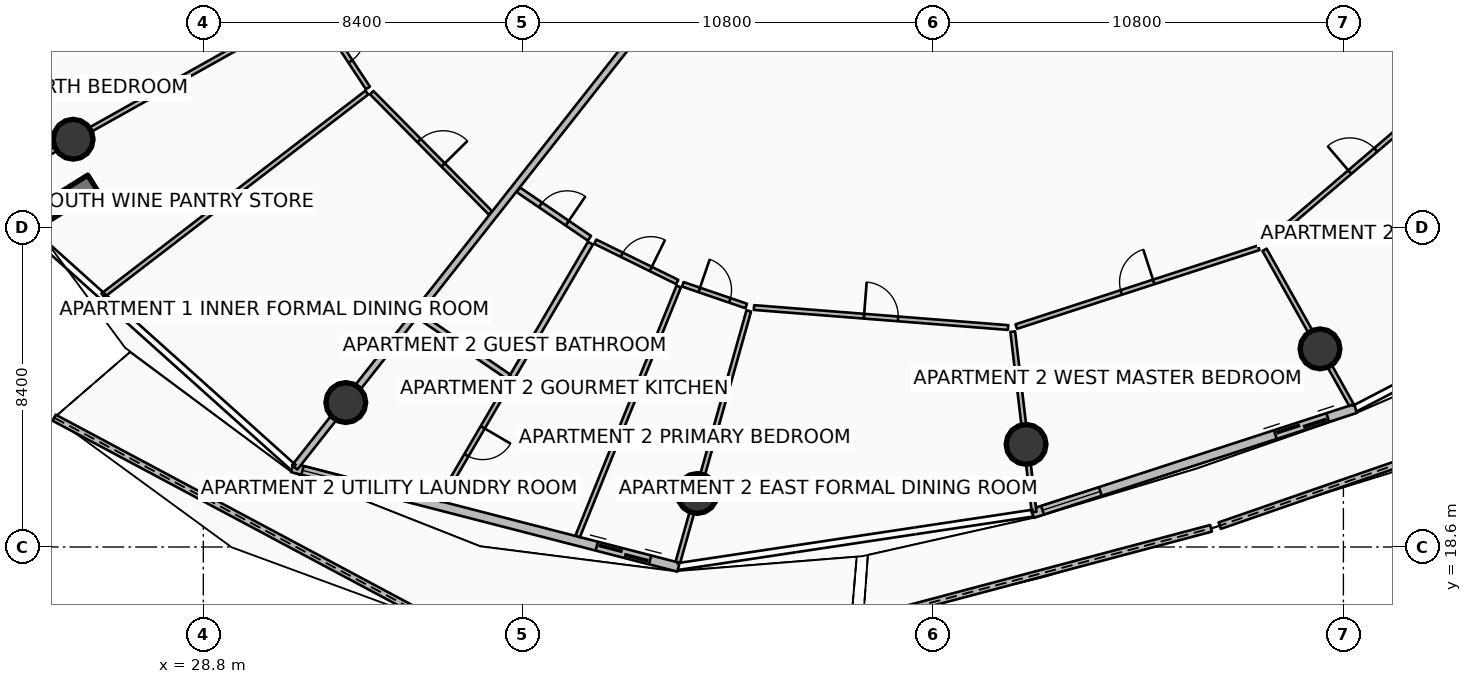
"""IFC4 building model, lengths in metres.
Left out: names, types, materials, properties, quantities, classifications, styles, units other than length and angle.
Written with IfcOpenShell. Run it as: python <this file> out.ifc"""

import sys

from ifc_helpers import new_model, si_unit, direction, frame, frame_2d, origin, origin_2d, place, context, subcontext, project, spatial, polyline, rectangle, circle, outline, extrude, element, fill, save


model = new_model("IFC4")
c1 = context("Model", 3, precision=1e-05, world=origin(), true_north=direction((0.0, 1.0)))
c2 = subcontext(c1, "Body", "Model", "MODEL_VIEW")
j1 = project(units=[si_unit("LENGTHUNIT", "METRE"), si_unit("PLANEANGLEUNIT", "RADIAN")], contexts=[c1])
p1 = place(None, origin())
s1 = spatial("IfcSite", under=j1, at=p1, CompositionType="ELEMENT")
p2 = place(p1, origin())
s2 = spatial("IfcBuilding", under=s1, at=p2, CompositionType="ELEMENT")
p3 = place(p2, frame((0.0, 0.0, 214.05)))
s3 = spatial("IfcBuildingStorey", under=s2, at=p3, CompositionType="ELEMENT", Elevation=214.05)
p4 = place(p3, frame((25.886, 28.182, 0.0), z_axis=(0.0, 0.0, 1.0), x_axis=(-0.848033572426, -0.529942506352, 0.0)))
e1 = element("IfcWall", 1, at=p4, inside=s3, PredefinedType="SOLIDWALL", context=c2, shape_type="SweptSolid", body=[
    extrude(rectangle(XDim=3.5, YDim=0.48, at=frame_2d((1.75, 0.0))), origin(), (0.0, 0.0, 1.0), 3.75),
])
for number, where, z_axis, x_axis in (
    (2, (25.375, 29.329, 0.0), (0.0, 0.0, 1.0), (1.0, 0.0, 0.0)),
    (3, (32.549, 22.401, 0.0), (0.0, 0.0, 1.0), (1.0, 0.0, 0.0)),
    (4, (41.798, 20.008, 0.0), (0.0, 0.0, 1.0), (1.0, 0.0, 0.0)),
    (5, (50.45, 21.3, 0.0), (0.0, 0.0, 1.0), (1.0, 0.0, 0.0)),
    (6, (58.185, 23.814, 0.0), (0.0, 0.0, 1.0), (1.0, 0.0, 0.0)),
):
    element("IfcColumn", number, at=place(p3, frame(where, z_axis=z_axis, x_axis=x_axis)), inside=s3, PredefinedType="COLUMN", context=c2, shape_type="SweptSolid", body=[
        extrude(circle(Radius=0.525, at=origin_2d()), origin(), (0.0, 0.0, 1.0), 3.5),
    ])
p5 = place(p3, frame((24.874, 22.003, 0.0), z_axis=(0.0, 0.0, 1.0), x_axis=(0.882077945567, -0.471103489632, 0.0)))
e7 = element("IfcWall", 7, at=p5, inside=s3, PredefinedType="PARAPET", context=c2, shape_type="SweptSolid", body=[
    extrude(outline(polyline([(0.0, 0.0), (11.409, 0.0), (11.409, 1.632), (5.705, 1.798), (0.0, 1.86), (0.0, 0.0)])), frame((0.0, 0.09, 0.0), z_axis=(0.0, -1.0, 0.0), x_axis=(1.0, 0.0, 0.0)), (0.0, 0.0, 1.0), 0.18),
])
p6 = place(p3, frame((46.162, 16.662, 0.0), z_axis=(0.0, 0.0, 1.0), x_axis=(0.96653117448, 0.256549193642, 0.0)))
e8 = element("IfcWall", 8, at=p6, inside=s3, PredefinedType="PARAPET", context=c2, shape_type="SweptSolid", body=[
    extrude(outline(polyline([(0.0, 0.0), (9.473, 0.0), (9.473, 1.148), (4.736, 1.127), (0.0, 1.224), (0.0, 0.0)])), frame((0.0, 0.09, 0.0), z_axis=(0.0, -1.0, 0.0), x_axis=(1.0, 0.0, 0.0)), (0.0, 0.0, 1.0), 0.18),
])
p7 = place(p3, frame((55.547, 19.162, 0.0), z_axis=(0.0, 0.0, 1.0), x_axis=(0.944943422405, 0.327233752007, 0.0)))
e9 = element("IfcWall", 9, at=p7, inside=s3, PredefinedType="PARAPET", context=c2, shape_type="SweptSolid", body=[
    extrude(outline(polyline([(0.0, 0.0), (9.597, 0.0), (9.598, 1.483), (4.799, 1.284), (0.0, 1.148), (0.0, 0.0)])), frame((0.0, 0.09, 0.0), z_axis=(0.0, -1.0, 0.0), x_axis=(1.0, 0.0, 0.0)), (0.0, 0.0, 1.0), 0.18),
])
p8 = place(p3, frame((31.14, 20.687, 0.0), z_axis=(0.0, 0.0, 1.0), x_axis=(0.968374028006, -0.249502989727, 0.0)))
e10 = element("IfcWall", 10, at=p8, inside=s3, PredefinedType="SOLIDWALL", context=c2, shape_type="SweptSolid", body=[
    extrude(rectangle(XDim=10.494, YDim=0.24, at=frame_2d((5.247, 0.0))), origin(), (0.0, 0.0, 1.0), 2.45),
])
p9 = place(p8, frame((8.274, 0.0, 0.0)))
e11 = element("IfcOpeningElement", 11, at=p9, cuts=e10, PredefinedType="OPENING", context=c2, shape_type="SweptSolid", body=[
    extrude(rectangle(XDim=1.45, YDim=2.15, at=frame_2d((0.725, 1.075))), frame((0.0, 0.13, 0.0), z_axis=(0.0, -1.0, 0.0), x_axis=(1.0, 0.0, 0.0)), (0.0, 0.0, 1.0), 0.26),
])
p10 = place(p8, frame((0.28, 0.0, 0.65)))
e12 = element("IfcOpeningElement", 12, at=p10, cuts=e10, PredefinedType="OPENING", context=c2, shape_type="SweptSolid", body=[
    extrude(rectangle(XDim=1.6, YDim=1.5, at=frame_2d((0.8, 0.75))), frame((0.0, 0.13, 0.0), z_axis=(0.0, -1.0, 0.0), x_axis=(1.0, 0.0, 0.0)), (0.0, 0.0, 1.0), 0.26),
])
p11 = place(p3, frame((50.616, 19.481, 0.0), z_axis=(0.0, 0.0, 1.0), x_axis=(0.951058543936, 0.309010753869, 0.0)))
e13 = element("IfcWall", 13, at=p11, inside=s3, PredefinedType="SOLIDWALL", context=c2, shape_type="SweptSolid", body=[
    extrude(rectangle(XDim=8.942, YDim=0.24, at=frame_2d((4.471, 0.0))), origin(), (0.0, 0.0, 1.0), 2.45),
])
p12 = place(p11, frame((6.722, 0.0, 0.0)))
e14 = element("IfcOpeningElement", 14, at=p12, cuts=e13, PredefinedType="OPENING", context=c2, shape_type="SweptSolid", body=[
    extrude(rectangle(XDim=1.45, YDim=2.15, at=frame_2d((0.725, 1.075))), frame((0.0, 0.13, 0.0), z_axis=(0.0, -1.0, 0.0), x_axis=(1.0, 0.0, 0.0)), (0.0, 0.0, 1.0), 0.26),
])
p13 = place(p11, frame((0.28, 0.0, 0.65)))
e15 = element("IfcOpeningElement", 15, at=p13, cuts=e13, PredefinedType="OPENING", context=c2, shape_type="SweptSolid", body=[
    extrude(rectangle(XDim=1.6, YDim=1.5, at=frame_2d((0.8, 0.75))), frame((0.0, 0.13, 0.0), z_axis=(0.0, -1.0, 0.0), x_axis=(1.0, 0.0, 0.0)), (0.0, 0.0, 1.0), 0.26),
])
p14 = place(p3, frame((41.113, 33.264, 0.0), z_axis=(0.0, 0.0, 1.0), x_axis=(-0.619089233189, -0.785320648748, 0.0)))
e16 = element("IfcWall", 16, at=p14, inside=s3, PredefinedType="PARTITIONING", context=c2, shape_type="SweptSolid", body=[
    extrude(rectangle(XDim=16.006, YDim=0.18, at=frame_2d((8.003, 0.0))), origin(), (0.0, 0.0, 1.0), 2.94),
])
p15 = place(p3, frame((31.602, 32.817, 0.0), z_axis=(0.0, 0.0, 1.0), x_axis=(-0.872494579812, -0.488623790047, 0.0)))
e17 = element("IfcWall", 17, at=p15, inside=s3, PredefinedType="PARTITIONING", context=c2, shape_type="SweptSolid", body=[
    extrude(rectangle(XDim=9.101, YDim=0.125, at=frame_2d((4.551, 0.0))), origin(), (0.0, 0.0, 1.0), 2.94),
])
p16 = place(p3, frame((33.104, 30.557, 0.0), z_axis=(0.0, 0.0, 1.0), x_axis=(-0.793029985802, -0.609182601212, 0.0)))
e18 = element("IfcWall", 18, at=p16, inside=s3, PredefinedType="PARTITIONING", context=c2, shape_type="SweptSolid", body=[
    extrude(rectangle(XDim=8.759, YDim=0.125, at=frame_2d((4.38, 0.0))), origin(), (0.0, 0.0, 1.0), 2.94),
])
p17 = place(p3, frame((31.745, 32.782, 0.0), z_axis=(0.0, 0.0, 1.0), x_axis=(0.550331787139, -0.834946060572, 0.0)))
e19 = element("IfcWall", 19, at=p17, inside=s3, PredefinedType="PARTITIONING", context=c2, shape_type="SweptSolid", body=[
    extrude(rectangle(XDim=2.519, YDim=0.125, at=frame_2d((1.26, 0.0))), origin(), (0.0, 0.0, 1.0), 2.94),
])
p18 = place(p17, frame((0.835, 0.0, 0.0)))
e20 = element("IfcOpeningElement", 20, at=p18, cuts=e19, PredefinedType="OPENING", context=c2, shape_type="SweptSolid", body=[
    extrude(rectangle(XDim=0.85, YDim=2.06, at=frame_2d((0.425, 1.03))), frame((0.0, 0.073, 0.0), z_axis=(0.0, -1.0, 0.0), x_axis=(1.0, 0.0, 0.0)), (0.0, 0.0, 1.0), 0.145),
])
p19 = place(p3, frame((33.231, 30.555, 0.0), z_axis=(0.0, 0.0, 1.0), x_axis=(0.702646714281, -0.711538892057, 0.0)))
e21 = element("IfcWall", 21, at=p19, inside=s3, PredefinedType="PARTITIONING", context=c2, shape_type="SweptSolid", body=[
    extrude(rectangle(XDim=4.448, YDim=0.125, at=frame_2d((2.224, 0.0))), origin(), (0.0, 0.0, 1.0), 2.94),
])
p20 = place(p19, frame((1.774, 0.0, 0.0)))
e22 = element("IfcOpeningElement", 22, at=p20, cuts=e21, PredefinedType="OPENING", context=c2, shape_type="SweptSolid", body=[
    extrude(rectangle(XDim=0.9, YDim=2.08, at=frame_2d((0.45, 1.04))), frame((0.0, 0.073, 0.0), z_axis=(0.0, -1.0, 0.0), x_axis=(1.0, 0.0, 0.0)), (0.0, 0.0, 1.0), 0.145),
])
p21 = place(p3, frame((37.089, 27.999, 0.0), z_axis=(0.0, 0.0, 1.0), x_axis=(0.826211362519, -0.563360261684, 0.0)))
e23 = element("IfcWall", 23, at=p21, inside=s3, PredefinedType="PARTITIONING", context=c2, shape_type="SweptSolid", body=[
    extrude(rectangle(XDim=2.263, YDim=0.15, at=frame_2d((1.131, 0.0))), origin(), (0.0, 0.0, 1.0), 2.94),
])
p22 = place(p21, frame((0.706, 0.0, 0.0)))
e24 = element("IfcOpeningElement", 24, at=p22, cuts=e23, PredefinedType="OPENING", context=c2, shape_type="SweptSolid", body=[
    extrude(rectangle(XDim=0.85, YDim=2.06, at=frame_2d((0.425, 1.03))), frame((0.0, 0.085, 0.0), z_axis=(0.0, -1.0, 0.0), x_axis=(1.0, 0.0, 0.0)), (0.0, 0.0, 1.0), 0.17),
])
p23 = place(p3, frame((34.477, 24.685, 0.0), z_axis=(0.0, 0.0, 1.0), x_axis=(0.826196481555, -0.563382085148, 0.0)))
e25 = element("IfcWall", 25, at=p23, inside=s3, PredefinedType="PARTITIONING", context=c2, shape_type="SweptSolid", body=[
    extrude(rectangle(XDim=2.845, YDim=0.15, at=frame_2d((1.423, 0.0))), origin(), (0.0, 0.0, 1.0), 2.94),
])
p24 = place(p3, frame((38.988, 26.596, 0.0), z_axis=(0.0, 0.0, 1.0), x_axis=(-0.504984010109, -0.863128698129, 0.0)))
e26 = element("IfcWall", 26, at=p24, inside=s3, PredefinedType="PARTITIONING", context=c2, shape_type="SweptSolid", body=[
    extrude(rectangle(XDim=4.09, YDim=0.15, at=frame_2d((2.045, 0.0))), origin(), (0.0, 0.0, 1.0), 2.94),
])
p25 = place(p3, frame((36.857, 22.953, 0.0), z_axis=(0.0, 0.0, 1.0), x_axis=(-0.504954980617, -0.863145681533, 0.0)))
e27 = element("IfcWall", 27, at=p25, inside=s3, PredefinedType="PARTITIONING", context=c2, shape_type="SweptSolid", body=[
    extrude(rectangle(XDim=3.64, YDim=0.125, at=frame_2d((1.82, 0.0))), origin(), (0.0, 0.0, 1.0), 2.94),
])
p26 = place(p25, frame((1.395, 0.0, 0.0)))
e28 = element("IfcOpeningElement", 28, at=p26, cuts=e27, PredefinedType="OPENING", context=c2, shape_type="SweptSolid", body=[
    extrude(rectangle(XDim=0.85, YDim=2.06, at=frame_2d((0.425, 1.03))), frame((0.0, 0.073, 0.0), z_axis=(0.0, -1.0, 0.0), x_axis=(1.0, 0.0, 0.0)), (0.0, 0.0, 1.0), 0.145),
])
p27 = place(p3, frame((41.309, 25.455, 0.0), z_axis=(0.0, 0.0, 1.0), x_axis=(-0.374907525365, -0.927062213352, 0.0)))
e29 = element("IfcWall", 29, at=p27, inside=s3, PredefinedType="PARTITIONING", context=c2, shape_type="SweptSolid", body=[
    extrude(rectangle(XDim=7.092, YDim=0.125, at=frame_2d((3.546, 0.0))), origin(), (0.0, 0.0, 1.0), 2.94),
])
p28 = place(p3, frame((39.114, 26.634, 0.0), z_axis=(0.0, 0.0, 1.0), x_axis=(0.897413929061, -0.441189573683, 0.0)))
e30 = element("IfcWall", 30, at=p28, inside=s3, PredefinedType="PARTITIONING", context=c2, shape_type="SweptSolid", body=[
    extrude(rectangle(XDim=2.403, YDim=0.125, at=frame_2d((1.202, 0.0))), origin(), (0.0, 0.0, 1.0), 2.94),
])
p29 = place(p28, frame((0.777, 0.0, 0.0)))
e31 = element("IfcOpeningElement", 31, at=p29, cuts=e30, PredefinedType="OPENING", context=c2, shape_type="SweptSolid", body=[
    extrude(rectangle(XDim=0.85, YDim=2.06, at=frame_2d((0.425, 1.03))), frame((0.0, 0.073, 0.0), z_axis=(0.0, -1.0, 0.0), x_axis=(1.0, 0.0, 0.0)), (0.0, 0.0, 1.0), 0.145),
])
p30 = place(p3, frame((41.418, 25.512, 0.0), z_axis=(0.0, 0.0, 1.0), x_axis=(0.946216458122, -0.32353425534, 0.0)))
e32 = element("IfcWall", 32, at=p30, inside=s3, PredefinedType="PARTITIONING", context=c2, shape_type="SweptSolid", body=[
    extrude(rectangle(XDim=1.762, YDim=0.125, at=frame_2d((0.881, 0.0))), origin(), (0.0, 0.0, 1.0), 2.94),
])
p31 = place(p30, frame((0.456, 0.0, 0.0)))
e33 = element("IfcOpeningElement", 33, at=p31, cuts=e32, PredefinedType="OPENING", context=c2, shape_type="SweptSolid", body=[
    extrude(rectangle(XDim=0.85, YDim=2.06, at=frame_2d((0.425, 1.03))), frame((0.0, 0.073, 0.0), z_axis=(0.0, -1.0, 0.0), x_axis=(1.0, 0.0, 0.0)), (0.0, 0.0, 1.0), 0.145),
])
p32 = place(p3, frame((43.153, 24.813, 0.0), z_axis=(0.0, 0.0, 1.0), x_axis=(-0.271433998897, -0.962457055791, 0.0)))
e34 = element("IfcWall", 34, at=p32, inside=s3, PredefinedType="PARTITIONING", context=c2, shape_type="SweptSolid", body=[
    extrude(rectangle(XDim=6.87, YDim=0.125, at=frame_2d((3.435, 0.0))), origin(), (0.0, 0.0, 1.0), 2.94),
])
p33 = place(p3, frame((43.29, 24.901, 0.0), z_axis=(0.0, 0.0, 1.0), x_axis=(0.996916756268, -0.078466432773, 0.0)))
e35 = element("IfcWall", 35, at=p33, inside=s3, PredefinedType="PARTITIONING", context=c2, shape_type="SweptSolid", body=[
    extrude(rectangle(XDim=6.708, YDim=0.125, at=frame_2d((3.354, 0.0))), origin(), (0.0, 0.0, 1.0), 2.94),
])
p34 = place(p33, frame((2.904, 0.0, 0.0)))
e36 = element("IfcOpeningElement", 36, at=p34, cuts=e35, PredefinedType="OPENING", context=c2, shape_type="SweptSolid", body=[
    extrude(rectangle(XDim=0.9, YDim=2.08, at=frame_2d((0.45, 1.04))), frame((0.0, 0.073, 0.0), z_axis=(0.0, -1.0, 0.0), x_axis=(1.0, 0.0, 0.0)), (0.0, 0.0, 1.0), 0.145),
])
p35 = place(p3, frame((50.099, 24.267, 0.0), z_axis=(0.0, 0.0, 1.0), x_axis=(0.117511168915, -0.993071560956, 0.0)))
e37 = element("IfcWall", 37, at=p35, inside=s3, PredefinedType="PARTITIONING", context=c2, shape_type="SweptSolid", body=[
    extrude(rectangle(XDim=4.779, YDim=0.125, at=frame_2d((2.389, 0.0))), origin(), (0.0, 0.0, 1.0), 2.94),
])
p36 = place(p3, frame((50.192, 24.4, 0.0), z_axis=(0.0, 0.0, 1.0), x_axis=(0.951057868445, 0.309012832854, 0.0)))
e38 = element("IfcWall", 38, at=p36, inside=s3, PredefinedType="PARTITIONING", context=c2, shape_type="SweptSolid", body=[
    extrude(rectangle(XDim=6.708, YDim=0.125, at=frame_2d((3.354, 0.0))), origin(), (0.0, 0.0, 1.0), 2.94),
])
p37 = place(p36, frame((2.904, 0.0, 0.0)))
e39 = element("IfcOpeningElement", 39, at=p37, cuts=e38, PredefinedType="OPENING", context=c2, shape_type="SweptSolid", body=[
    extrude(rectangle(XDim=0.9, YDim=2.08, at=frame_2d((0.45, 1.04))), frame((0.0, 0.073, 0.0), z_axis=(0.0, -1.0, 0.0), x_axis=(1.0, 0.0, 0.0)), (0.0, 0.0, 1.0), 0.145),
])
p38 = place(p3, frame((56.725, 26.42, 0.0), z_axis=(0.0, 0.0, 1.0), x_axis=(0.488595423778, -0.872510465189, 0.0)))
e40 = element("IfcWall", 40, at=p38, inside=s3, PredefinedType="PARTITIONING", context=c2, shape_type="SweptSolid", body=[
    extrude(rectangle(XDim=4.678, YDim=0.125, at=frame_2d((2.339, 0.0))), origin(), (0.0, 0.0, 1.0), 2.94),
])
p39 = place(p3, frame((56.76, 26.579, 0.0), z_axis=(0.0, 0.0, 1.0), x_axis=(0.760424223761, 0.649426670161, 0.0)))
e41 = element("IfcWall", 41, at=p39, inside=s3, PredefinedType="PARTITIONING", context=c2, shape_type="SweptSolid", body=[
    extrude(rectangle(XDim=6.708, YDim=0.125, at=frame_2d((3.354, 0.0))), origin(), (0.0, 0.0, 1.0), 2.94),
])
p40 = place(p39, frame((2.904, 0.0, 0.0)))
e42 = element("IfcOpeningElement", 42, at=p40, cuts=e41, PredefinedType="OPENING", context=c2, shape_type="SweptSolid", body=[
    extrude(rectangle(XDim=0.9, YDim=2.08, at=frame_2d((0.45, 1.04))), frame((0.0, 0.073, 0.0), z_axis=(0.0, -1.0, 0.0), x_axis=(1.0, 0.0, 0.0)), (0.0, 0.0, 1.0), 0.145),
])
p41 = place(p9, origin())
e43 = element("IfcDoor", 43, at=p41, inside=s3, OperationType="DOUBLE_DOOR_SLIDING", PredefinedType="DOOR", context=c2, shape_type="SweptSolid", body=[
    extrude(rectangle(XDim=1.45, YDim=2.15, at=frame_2d((0.725, 1.075))), frame((0.0, 0.025, 0.0), z_axis=(0.0, -1.0, 0.0), x_axis=(1.0, 0.0, 0.0)), (0.0, 0.0, 1.0), 0.05),
])
fill(e11, e43)
p42 = place(p10, origin())
e44 = element("IfcWindow", 44, at=p42, inside=s3, PartitioningType="SINGLE_PANEL", PredefinedType="WINDOW", context=c2, shape_type="SweptSolid", body=[
    extrude(rectangle(XDim=1.6, YDim=1.5, at=frame_2d((0.8, 0.75))), frame((0.0, 0.03, 0.0), z_axis=(0.0, -1.0, 0.0), x_axis=(1.0, 0.0, 0.0)), (0.0, 0.0, 1.0), 0.06),
])
fill(e12, e44)
p43 = place(p12, origin())
e45 = element("IfcDoor", 45, at=p43, inside=s3, OperationType="DOUBLE_DOOR_SLIDING", PredefinedType="DOOR", context=c2, shape_type="SweptSolid", body=[
    extrude(rectangle(XDim=1.45, YDim=2.15, at=frame_2d((0.725, 1.075))), frame((0.0, 0.025, 0.0), z_axis=(0.0, -1.0, 0.0), x_axis=(1.0, 0.0, 0.0)), (0.0, 0.0, 1.0), 0.05),
])
fill(e14, e45)
p44 = place(p13, origin())
e46 = element("IfcWindow", 46, at=p44, inside=s3, PartitioningType="SINGLE_PANEL", PredefinedType="WINDOW", context=c2, shape_type="SweptSolid", body=[
    extrude(rectangle(XDim=1.6, YDim=1.5, at=frame_2d((0.8, 0.75))), frame((0.0, 0.03, 0.0), z_axis=(0.0, -1.0, 0.0), x_axis=(1.0, 0.0, 0.0)), (0.0, 0.0, 1.0), 0.06),
])
fill(e15, e46)
p45 = place(p18, origin())
e47 = element("IfcDoor", 47, at=p45, inside=s3, OperationType="SINGLE_SWING_LEFT", PredefinedType="DOOR", context=c2, shape_type="SweptSolid", body=[
    extrude(rectangle(XDim=0.85, YDim=2.06, at=frame_2d((0.425, 1.03))), frame((0.0, 0.025, 0.0), z_axis=(0.0, -1.0, 0.0), x_axis=(1.0, 0.0, 0.0)), (0.0, 0.0, 1.0), 0.05),
])
fill(e20, e47)
p46 = place(p20, origin())
e48 = element("IfcDoor", 48, at=p46, inside=s3, OperationType="SINGLE_SWING_RIGHT", PredefinedType="DOOR", context=c2, shape_type="SweptSolid", body=[
    extrude(rectangle(XDim=0.9, YDim=2.08, at=frame_2d((0.45, 1.04))), frame((0.0, 0.025, 0.0), z_axis=(0.0, -1.0, 0.0), x_axis=(1.0, 0.0, 0.0)), (0.0, 0.0, 1.0), 0.05),
])
fill(e22, e48)
p47 = place(p22, origin())
e49 = element("IfcDoor", 49, at=p47, inside=s3, OperationType="SINGLE_SWING_RIGHT", PredefinedType="DOOR", context=c2, shape_type="SweptSolid", body=[
    extrude(rectangle(XDim=0.85, YDim=2.06, at=frame_2d((0.425, 1.03))), frame((0.0, 0.025, 0.0), z_axis=(0.0, -1.0, 0.0), x_axis=(1.0, 0.0, 0.0)), (0.0, 0.0, 1.0), 0.05),
])
fill(e24, e49)
p48 = place(p26, origin())
e50 = element("IfcDoor", 50, at=p48, inside=s3, OperationType="SINGLE_SWING_LEFT", PredefinedType="DOOR", context=c2, shape_type="SweptSolid", body=[
    extrude(rectangle(XDim=0.85, YDim=2.06, at=frame_2d((0.425, 1.03))), frame((0.0, 0.025, 0.0), z_axis=(0.0, -1.0, 0.0), x_axis=(1.0, 0.0, 0.0)), (0.0, 0.0, 1.0), 0.05),
])
fill(e28, e50)
p49 = place(p29, origin())
e51 = element("IfcDoor", 51, at=p49, inside=s3, OperationType="SINGLE_SWING_RIGHT", PredefinedType="DOOR", context=c2, shape_type="SweptSolid", body=[
    extrude(rectangle(XDim=0.85, YDim=2.06, at=frame_2d((0.425, 1.03))), frame((0.0, 0.025, 0.0), z_axis=(0.0, -1.0, 0.0), x_axis=(1.0, 0.0, 0.0)), (0.0, 0.0, 1.0), 0.05),
])
fill(e31, e51)
p50 = place(p31, origin())
e52 = element("IfcDoor", 52, at=p50, inside=s3, OperationType="SINGLE_SWING_LEFT", PredefinedType="DOOR", context=c2, shape_type="SweptSolid", body=[
    extrude(rectangle(XDim=0.85, YDim=2.06, at=frame_2d((0.425, 1.03))), frame((0.0, 0.025, 0.0), z_axis=(0.0, -1.0, 0.0), x_axis=(1.0, 0.0, 0.0)), (0.0, 0.0, 1.0), 0.05),
])
fill(e33, e52)
p51 = place(p34, origin())
e53 = element("IfcDoor", 53, at=p51, inside=s3, OperationType="SINGLE_SWING_LEFT", PredefinedType="DOOR", context=c2, shape_type="SweptSolid", body=[
    extrude(rectangle(XDim=0.9, YDim=2.08, at=frame_2d((0.45, 1.04))), frame((0.0, 0.025, 0.0), z_axis=(0.0, -1.0, 0.0), x_axis=(1.0, 0.0, 0.0)), (0.0, 0.0, 1.0), 0.05),
])
fill(e36, e53)
p52 = place(p37, origin())
e54 = element("IfcDoor", 54, at=p52, inside=s3, OperationType="SINGLE_SWING_RIGHT", PredefinedType="DOOR", context=c2, shape_type="SweptSolid", body=[
    extrude(rectangle(XDim=0.9, YDim=2.08, at=frame_2d((0.45, 1.04))), frame((0.0, 0.025, 0.0), z_axis=(0.0, -1.0, 0.0), x_axis=(1.0, 0.0, 0.0)), (0.0, 0.0, 1.0), 0.05),
])
fill(e39, e54)
p53 = place(p40, origin())
e55 = element("IfcDoor", 55, at=p53, inside=s3, OperationType="SINGLE_SWING_LEFT", PredefinedType="DOOR", context=c2, shape_type="SweptSolid", body=[
    extrude(rectangle(XDim=0.9, YDim=2.08, at=frame_2d((0.45, 1.04))), frame((0.0, 0.025, 0.0), z_axis=(0.0, -1.0, 0.0), x_axis=(1.0, 0.0, 0.0)), (0.0, 0.0, 1.0), 0.05),
])
fill(e42, e55)
save(model, sys.argv[1])
